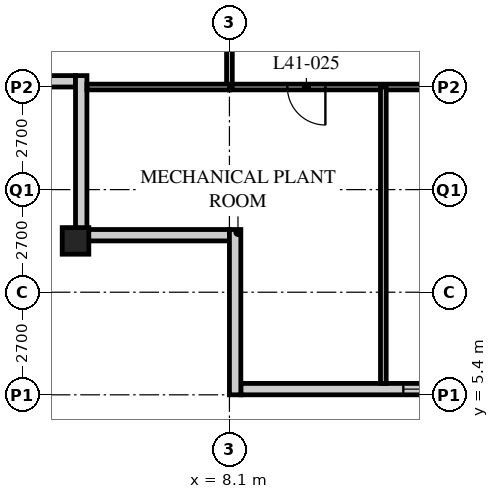
"""IFC4 building model, lengths in metres.
Left out: names, types, materials, properties, quantities, classifications, styles, units other than length and angle.
Written with IfcOpenShell. Run it as: python <this file> out.ifc"""

import sys

from ifc_helpers import new_model, si_unit, direction, frame, frame_2d, origin, origin_2d, place, context, subcontext, project, spatial, rectangle, hollow_rectangle, extrude, element, fill, save


model = new_model("IFC4")
c1 = context("Model", 3, precision=1e-05, world=origin(), true_north=direction((0.0, 1.0)))
c2 = subcontext(c1, "Body", "Model", "MODEL_VIEW")
j1 = project(units=[si_unit("LENGTHUNIT", "METRE"), si_unit("PLANEANGLEUNIT", "RADIAN")], contexts=[c1])
p1 = place(None, origin())
s1 = spatial("IfcSite", under=j1, at=p1, CompositionType="ELEMENT")
p2 = place(p1, origin())
s2 = spatial("IfcBuilding", under=s1, at=p2, CompositionType="ELEMENT")
p3 = place(p2, frame((0.0, 0.0, 157.8)))
s3 = spatial("IfcBuildingStorey", under=s2, at=p3, CompositionType="ELEMENT", Elevation=157.8)
p4 = place(p3, frame((4.05, 9.45, 0.0), z_axis=(0.0, 0.0, 1.0), x_axis=(1.0, 0.0, 0.0)))
e1 = element("IfcColumn", 1, at=p4, inside=s3, PredefinedType="COLUMN", context=c2, shape_type="SweptSolid", body=[
    extrude(hollow_rectangle(XDim=0.7, YDim=0.7, WallThickness=0.07, at=origin_2d()), origin(), (0.0, 0.0, 1.0), 7.2),
])
p5 = place(p3, frame((8.4, 5.55, 0.0), z_axis=(0.0, 0.0, 1.0), x_axis=(1.0, 0.0, 0.0)))
e2 = element("IfcWall", 2, at=p5, inside=s3, PredefinedType="SOLIDWALL", context=c2, shape_type="SweptSolid", body=[
    extrude(rectangle(XDim=40.2, YDim=0.3, at=frame_2d((20.1, 0.0))), origin(), (0.0, 0.0, 1.0), 5.95),
])
p6 = place(p5, frame((4.275, 0.0, 1.0)))
e3 = element("IfcOpeningElement", 3, at=p6, cuts=e2, PredefinedType="OPENING", context=c2, shape_type="SweptSolid", body=[
    extrude(rectangle(XDim=3.0, YDim=1.8, at=frame_2d((1.5, 0.9))), frame((0.0, 0.16, 0.0), z_axis=(0.0, -1.0, 0.0), x_axis=(1.0, 0.0, 0.0)), (0.0, 0.0, 1.0), 0.32),
])
p7 = place(p5, frame((12.375, 0.0, 1.0)))
e4 = element("IfcOpeningElement", 4, at=p7, cuts=e2, PredefinedType="OPENING", context=c2, shape_type="SweptSolid", body=[
    extrude(rectangle(XDim=3.0, YDim=1.8, at=frame_2d((1.5, 0.9))), frame((0.0, 0.16, 0.0), z_axis=(0.0, -1.0, 0.0), x_axis=(1.0, 0.0, 0.0)), (0.0, 0.0, 1.0), 0.32),
])
p8 = place(p5, frame((24.525, 0.0, 1.0)))
e5 = element("IfcOpeningElement", 5, at=p8, cuts=e2, PredefinedType="OPENING", context=c2, shape_type="SweptSolid", body=[
    extrude(rectangle(XDim=3.0, YDim=1.8, at=frame_2d((1.5, 0.9))), frame((0.0, 0.16, 0.0), z_axis=(0.0, -1.0, 0.0), x_axis=(1.0, 0.0, 0.0)), (0.0, 0.0, 1.0), 0.32),
])
p9 = place(p5, frame((32.625, 0.0, 1.0)))
e6 = element("IfcOpeningElement", 6, at=p9, cuts=e2, PredefinedType="OPENING", context=c2, shape_type="SweptSolid", body=[
    extrude(rectangle(XDim=3.0, YDim=1.8, at=frame_2d((1.5, 0.9))), frame((0.0, 0.16, 0.0), z_axis=(0.0, -1.0, 0.0), x_axis=(1.0, 0.0, 0.0)), (0.0, 0.0, 1.0), 0.32),
])
p10 = place(p3, frame((0.3, 13.65, 0.0), z_axis=(0.0, 0.0, 1.0), x_axis=(1.0, 0.0, 0.0)))
e7 = element("IfcWall", 7, at=p10, inside=s3, PredefinedType="SOLIDWALL", context=c2, shape_type="SweptSolid", body=[
    extrude(rectangle(XDim=3.75, YDim=0.3, at=frame_2d((1.875, 0.0))), origin(), (0.0, 0.0, 1.0), 6.95),
])
p11 = place(p3, frame((4.2, 13.8, 0.0), z_axis=(0.0, 0.0, 1.0), x_axis=(0.0, -1.0, 0.0)))
e8 = element("IfcWall", 8, at=p11, inside=s3, PredefinedType="SOLIDWALL", context=c2, shape_type="SweptSolid", body=[
    extrude(rectangle(XDim=4.35, YDim=0.3, at=frame_2d((2.175, 0.0))), origin(), (0.0, 0.0, 1.0), 6.25),
])
p12 = place(p3, frame((4.35, 9.6, 0.0), z_axis=(0.0, 0.0, 1.0), x_axis=(1.0, 0.0, 0.0)))
e9 = element("IfcWall", 9, at=p12, inside=s3, PredefinedType="SOLIDWALL", context=c2, shape_type="SweptSolid", body=[
    extrude(rectangle(XDim=3.75, YDim=0.3, at=frame_2d((1.875, 0.0))), origin(), (0.0, 0.0, 1.0), 6.25),
])
p13 = place(p3, frame((8.25, 9.75, 0.0), z_axis=(0.0, 0.0, 1.0), x_axis=(0.0, -1.0, 0.0)))
e10 = element("IfcWall", 10, at=p13, inside=s3, PredefinedType="SOLIDWALL", context=c2, shape_type="SweptSolid", body=[
    extrude(rectangle(XDim=4.35, YDim=0.3, at=frame_2d((2.175, 0.0))), origin(), (0.0, 0.0, 1.0), 5.95),
])
p14 = place(p3, frame((8.1, 13.5, 0.0), z_axis=(0.0, 0.0, 1.0), x_axis=(1.0, 0.0, 0.0)))
e11 = element("IfcWall", 11, at=p14, inside=s3, PredefinedType="PARTITIONING", context=c2, shape_type="SweptSolid", body=[
    extrude(rectangle(XDim=40.5, YDim=0.15, at=frame_2d((20.25, 0.0))), origin(), (0.0, 0.0, 1.0), 6.95),
])
p15 = place(p14, frame((11.25, 0.0, 0.0)))
e12 = element("IfcOpeningElement", 12, at=p15, cuts=e11, PredefinedType="OPENING", context=c2, shape_type="SweptSolid", body=[
    extrude(rectangle(XDim=1.8, YDim=2.4, at=frame_2d((0.9, 1.2))), frame((0.0, 0.085, 0.0), z_axis=(0.0, -1.0, 0.0), x_axis=(1.0, 0.0, 0.0)), (0.0, 0.0, 1.0), 0.17),
])
p16 = place(p14, frame((27.45, 0.0, 0.0)))
e13 = element("IfcOpeningElement", 13, at=p16, cuts=e11, PredefinedType="OPENING", context=c2, shape_type="SweptSolid", body=[
    extrude(rectangle(XDim=1.8, YDim=2.4, at=frame_2d((0.9, 1.2))), frame((0.0, 0.085, 0.0), z_axis=(0.0, -1.0, 0.0), x_axis=(1.0, 0.0, 0.0)), (0.0, 0.0, 1.0), 0.17),
])
p17 = place(p14, frame((1.525, 0.0, 0.0)))
e14 = element("IfcOpeningElement", 14, at=p17, cuts=e11, PredefinedType="OPENING", context=c2, shape_type="SweptSolid", body=[
    extrude(rectangle(XDim=1.0, YDim=2.1, at=frame_2d((0.5, 1.05))), frame((0.0, 0.085, 0.0), z_axis=(0.0, -1.0, 0.0), x_axis=(1.0, 0.0, 0.0)), (0.0, 0.0, 1.0), 0.17),
])
p18 = place(p14, frame((37.975, 0.0, 0.0)))
e15 = element("IfcOpeningElement", 15, at=p18, cuts=e11, PredefinedType="OPENING", context=c2, shape_type="SweptSolid", body=[
    extrude(rectangle(XDim=1.0, YDim=2.1, at=frame_2d((0.5, 1.05))), frame((0.0, 0.085, 0.0), z_axis=(0.0, -1.0, 0.0), x_axis=(1.0, 0.0, 0.0)), (0.0, 0.0, 1.0), 0.17),
])
p19 = place(p3, frame((8.1, 13.5, 0.0), z_axis=(0.0, 0.0, 1.0), x_axis=(0.0, 1.0, 0.0)))
e16 = element("IfcWall", 16, at=p19, inside=s3, PredefinedType="PARTITIONING", context=c2, shape_type="SweptSolid", body=[
    extrude(rectangle(XDim=32.4, YDim=0.15, at=frame_2d((16.2, 0.0))), origin(), (0.0, 0.0, 1.0), 5.95),
])
p20 = place(p19, frame((10.95, 0.0, 0.0)))
e17 = element("IfcOpeningElement", 17, at=p20, cuts=e16, PredefinedType="OPENING", context=c2, shape_type="SweptSolid", body=[
    extrude(rectangle(XDim=1.8, YDim=2.4, at=frame_2d((0.9, 1.2))), frame((0.0, 0.085, 0.0), z_axis=(0.0, -1.0, 0.0), x_axis=(1.0, 0.0, 0.0)), (0.0, 0.0, 1.0), 0.17),
])
p21 = place(p19, frame((27.15, 0.0, 0.0)))
e18 = element("IfcOpeningElement", 18, at=p21, cuts=e16, PredefinedType="OPENING", context=c2, shape_type="SweptSolid", body=[
    extrude(rectangle(XDim=1.8, YDim=2.4, at=frame_2d((0.9, 1.2))), frame((0.0, 0.085, 0.0), z_axis=(0.0, -1.0, 0.0), x_axis=(1.0, 0.0, 0.0)), (0.0, 0.0, 1.0), 0.17),
])
p22 = place(p3, frame((4.35, 13.5, 0.0), z_axis=(0.0, 0.0, 1.0), x_axis=(1.0, 0.0, 0.0)))
e19 = element("IfcWall", 19, at=p22, inside=s3, PredefinedType="PARTITIONING", context=c2, shape_type="SweptSolid", body=[
    extrude(rectangle(XDim=3.75, YDim=0.15, at=frame_2d((1.875, 0.0))), origin(), (0.0, 0.0, 1.0), 6.95),
])
p23 = place(p3, frame((12.15, 13.5, 0.0), z_axis=(0.0, 0.0, 1.0), x_axis=(0.0, -1.0, 0.0)))
e20 = element("IfcWall", 20, at=p23, inside=s3, PredefinedType="PARTITIONING", context=c2, shape_type="SweptSolid", body=[
    extrude(rectangle(XDim=7.8, YDim=0.15, at=frame_2d((3.9, 0.0))), origin(), (0.0, 0.0, 1.0), 6.95),
])
p24 = place(p6, origin())
e21 = element("IfcWindow", 21, at=p24, inside=s3, PartitioningType="SINGLE_PANEL", PredefinedType="USERDEFINED", context=c2, shape_type="SweptSolid", body=[
    extrude(rectangle(XDim=3.0, YDim=1.8, at=frame_2d((1.5, 0.9))), frame((0.0, 0.075, 0.0), z_axis=(0.0, -1.0, 0.0), x_axis=(1.0, 0.0, 0.0)), (0.0, 0.0, 1.0), 0.15),
])
fill(e3, e21)
p25 = place(p17, origin())
e22 = element("IfcDoor", 22, at=p25, inside=s3, OperationType="SINGLE_SWING_LEFT", PredefinedType="DOOR", context=c2, shape_type="SweptSolid", body=[
    extrude(rectangle(XDim=1.0, YDim=2.1, at=frame_2d((0.5, 1.05))), frame((0.0, 0.025, 0.0), z_axis=(0.0, -1.0, 0.0), x_axis=(1.0, 0.0, 0.0)), (0.0, 0.0, 1.0), 0.05),
])
fill(e14, e22)
save(model, sys.argv[1])
